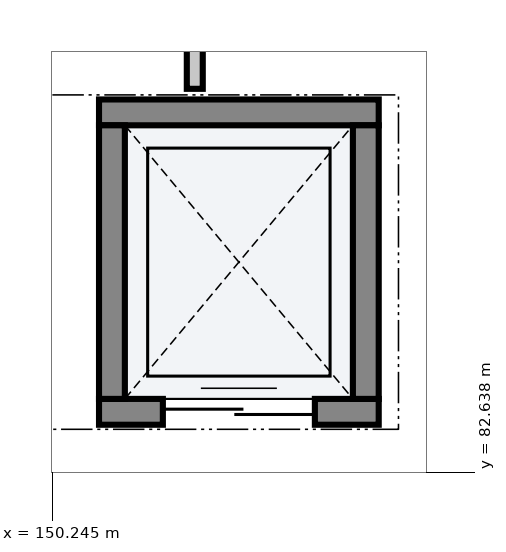
"""IFC4 building model, lengths in metres.
Left out: names, types, materials, properties, quantities, classifications, styles, units other than length and angle.
Written with IfcOpenShell. Run it as: python <this file> out.ifc"""

import sys

from ifc_helpers import new_model, si_unit, direction, frame, frame_2d, origin, place, context, subcontext, project, spatial, rectangle, extrude, element, fill, save


model = new_model("IFC4")
c1 = context("Model", 3, precision=1e-05, world=origin(), true_north=direction((0.0, 1.0)))
c2 = subcontext(c1, "Body", "Model", "MODEL_VIEW")
j1 = project(units=[si_unit("LENGTHUNIT", "METRE"), si_unit("PLANEANGLEUNIT", "RADIAN")], contexts=[c1])
p1 = place(None, origin())
s1 = spatial("IfcSite", under=j1, at=p1, CompositionType="ELEMENT")
p2 = place(p1, origin())
s2 = spatial("IfcBuilding", under=s1, at=p2, CompositionType="ELEMENT")
p3 = place(p2, frame((0.0, 0.0, 5.4)))
s3 = spatial("IfcBuildingStorey", under=s2, at=p3, CompositionType="ELEMENT", Elevation=5.4)
p4 = place(p3, frame((150.86, 83.43, 0.0), z_axis=(0.0, 0.0, 1.0), x_axis=(1.0, 0.0, 0.0)))
e1 = element("IfcWall", 1, at=p4, inside=s3, PredefinedType="SHEAR", context=c2, shape_type="SweptSolid", body=[
    extrude(rectangle(XDim=3.68, YDim=0.34, at=frame_2d((1.84, 0.0))), origin(), (0.0, 0.0, 1.0), 4.505),
])
p5 = place(p4, frame((0.84, 0.0, 0.0)))
e2 = element("IfcOpeningElement", 2, at=p5, cuts=e1, PredefinedType="OPENING", context=c2, shape_type="SweptSolid", body=[
    extrude(rectangle(XDim=2.0, YDim=2.4, at=frame_2d((1.0, 1.2))), frame((0.0, 0.182, 0.0), z_axis=(0.0, -1.0, 0.0), x_axis=(1.0, 0.0, 0.0)), (0.0, 0.0, 1.0), 0.364),
])
p6 = place(p3, frame((150.86, 87.37, 0.0), z_axis=(0.0, 0.0, 1.0), x_axis=(1.0, 0.0, 0.0)))
e3 = element("IfcWall", 3, at=p6, inside=s3, PredefinedType="SHEAR", context=c2, shape_type="SweptSolid", body=[
    extrude(rectangle(XDim=3.68, YDim=0.34, at=frame_2d((1.84, 0.0))), origin(), (0.0, 0.0, 1.0), 4.505),
])
for number, where, z_axis, x_axis in (
    (4, (151.03, 83.6, 0.0), (0.0, 0.0, 1.0), (0.0, 1.0, 0.0)),
    (5, (154.37, 83.6, 0.0), (0.0, 0.0, 1.0), (0.0, 1.0, 0.0)),
):
    element("IfcWall", number, at=place(p3, frame(where, z_axis=z_axis, x_axis=x_axis)), inside=s3, PredefinedType="SHEAR", context=c2, shape_type="SweptSolid", body=[
        extrude(rectangle(XDim=3.6, YDim=0.34, at=frame_2d((1.8, 0.0))), origin(), (0.0, 0.0, 1.0), 4.505),
    ])
p7 = place(p3, frame((152.12, 87.68, 0.0), z_axis=(0.0, 0.0, 1.0), x_axis=(0.0, 1.0, 0.0)))
e6 = element("IfcWall", 6, at=p7, inside=s3, PredefinedType="PARTITIONING", context=c2, shape_type="SweptSolid", body=[
    extrude(rectangle(XDim=9.8, YDim=0.21, at=frame_2d((4.9, 0.0))), origin(), (0.0, 0.0, 1.0), 3.445),
])
p8 = place(p7, frame((3.975, 0.0, 0.0)))
e7 = element("IfcOpeningElement", 7, at=p8, cuts=e6, PredefinedType="OPENING", context=c2, shape_type="SweptSolid", body=[
    extrude(rectangle(XDim=1.85, YDim=2.35, at=frame_2d((0.925, 1.175))), frame((0.0, 0.117, 0.0), z_axis=(0.0, -1.0, 0.0), x_axis=(1.0, 0.0, 0.0)), (0.0, 0.0, 1.0), 0.234),
])
p9 = place(p5, origin())
e8 = element("IfcDoor", 8, at=p9, inside=s3, OperationType="DOUBLE_DOOR_SLIDING", PredefinedType="DOOR", context=c2, shape_type="SweptSolid", body=[
    extrude(rectangle(XDim=2.0, YDim=2.4, at=frame_2d((1.0, 1.2))), frame((0.0, 0.025, 0.0), z_axis=(0.0, -1.0, 0.0), x_axis=(1.0, 0.0, 0.0)), (0.0, 0.0, 1.0), 0.05),
])
fill(e2, e8)
save(model, sys.argv[1])
